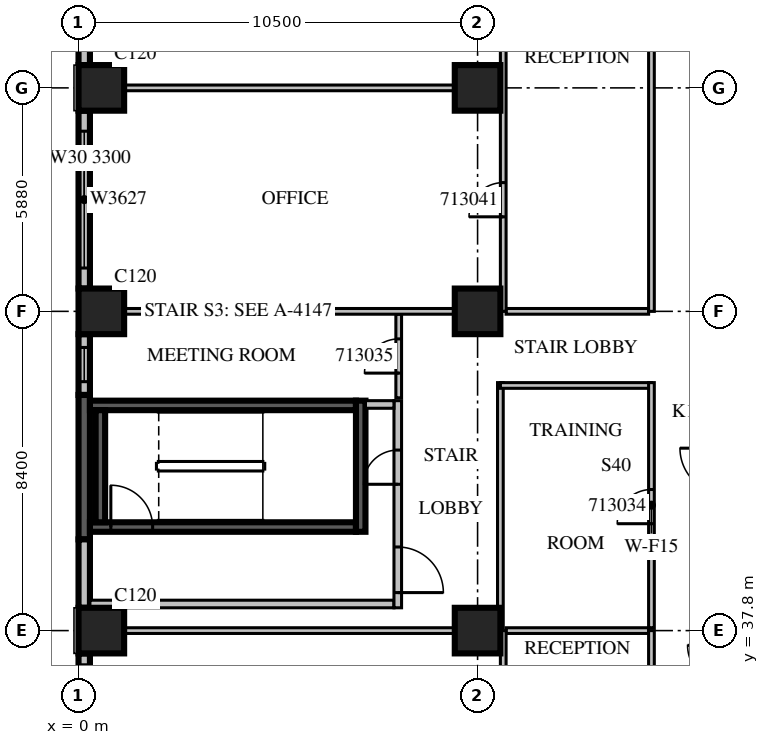
"""IFC4 building model, lengths in metres.
Left out: names, types, materials, properties, quantities, classifications, styles, units other than length and angle.
Written with IfcOpenShell. Run it as: python <this file> out.ifc"""

import sys

from ifc_helpers import new_model, si_unit, direction, frame, frame_2d, origin, origin_2d, place, context, subcontext, project, spatial, rectangle, extrude, source, transform, mapped, element, fill, save


model = new_model("IFC4")
c1 = context("Model", 3, precision=1e-05, world=origin(), true_north=direction((0.0, 1.0)))
c2 = subcontext(c1, "Body", "Model", "MODEL_VIEW")
j1 = project(units=[si_unit("LENGTHUNIT", "METRE"), si_unit("PLANEANGLEUNIT", "RADIAN")], contexts=[c1])
p1 = place(None, origin())
s1 = spatial("IfcSite", under=j1, at=p1, CompositionType="ELEMENT")
p2 = place(p1, origin())
s2 = spatial("IfcBuilding", under=s1, at=p2, CompositionType="ELEMENT")
p3 = place(p2, frame((0.0, 0.0, 65.7)))
s3 = spatial("IfcBuildingStorey", under=s2, at=p3, CompositionType="ELEMENT", Elevation=65.7)
m1 = source(origin(), c2, "Body", "SweptSolid", [
    extrude(rectangle(XDim=1.2, YDim=1.2, at=origin_2d()), origin(), (0.0, 0.0, 1.0), 4.2),
])
for number, where, z_axis, x_axis in (
    (1, (0.6, 37.8, 0.0), (0.0, 0.0, 1.0), (1.0, 0.0, 0.0)),
    (2, (10.5, 37.8, 0.0), (0.0, 0.0, 1.0), (1.0, 0.0, 0.0)),
    (3, (0.6, 46.2, 0.0), (0.0, 0.0, 1.0), (1.0, 0.0, 0.0)),
    (4, (10.5, 46.2, 0.0), (0.0, 0.0, 1.0), (1.0, 0.0, 0.0)),
    (5, (0.6, 52.08, 0.0), (0.0, 0.0, 1.0), (1.0, 0.0, 0.0)),
    (6, (10.5, 52.08, 0.0), (0.0, 0.0, 1.0), (1.0, 0.0, 0.0)),
):
    element("IfcColumn", number, at=place(p3, frame(where, z_axis=z_axis, x_axis=x_axis)), inside=s3, PredefinedType="COLUMN", context=c2, shape_type="MappedRepresentation", body=[
        mapped(m1, transform((0.0, 0.0, 0.0), scale=1.0)),
    ])
m2 = source(origin(), c2, "Body", "SweptSolid", [
    extrude(rectangle(XDim=4.68, YDim=0.3, at=frame_2d((2.34, 0.0))), origin(), (0.0, 0.0, 1.0), 3.3),
])
p4 = place(p3, frame((0.15, 57.36, 0.0), z_axis=(0.0, 0.0, 1.0), x_axis=(0.0, -1.0, 0.0)))
e7 = element("IfcWall", 7, at=p4, inside=s3, PredefinedType="STANDARD", context=c2, shape_type="MappedRepresentation", body=[
    mapped(m2, transform((0.0, 0.0, 0.0), scale=1.0)),
])
m3 = source(origin(), c2, "Body", "SweptSolid", [
    extrude(rectangle(XDim=1.2, YDim=2.7, at=frame_2d((0.6, 1.35))), frame((0.0, 0.16, 0.0), z_axis=(0.0, -1.0, 0.0), x_axis=(1.0, 0.0, 0.0)), (0.0, 0.0, 1.0), 0.32),
])
p5 = place(p4, frame((0.165, 0.0, 0.6)))
e8 = element("IfcOpeningElement", 8, at=p5, cuts=e7, PredefinedType="OPENING", context=c2, shape_type="MappedRepresentation", body=[
    mapped(m3, transform((0.0, 0.0, 0.0), scale=1.0)),
])
m4 = source(origin(), c2, "Body", "SweptSolid", [
    extrude(rectangle(XDim=2.4, YDim=2.7, at=frame_2d((1.2, 1.35))), frame((0.0, 0.16, 0.0), z_axis=(0.0, -1.0, 0.0), x_axis=(1.0, 0.0, 0.0)), (0.0, 0.0, 1.0), 0.32),
])
p6 = place(p4, frame((1.823, 0.0, 0.6)))
e9 = element("IfcOpeningElement", 9, at=p6, cuts=e7, PredefinedType="OPENING", context=c2, shape_type="MappedRepresentation", body=[
    mapped(m4, transform((0.0, 0.0, 0.0), scale=1.0)),
])
p7 = place(p3, frame((0.15, 51.48, 0.0), z_axis=(0.0, 0.0, 1.0), x_axis=(0.0, -1.0, 0.0)))
e10 = element("IfcWall", 10, at=p7, inside=s3, PredefinedType="STANDARD", context=c2, shape_type="MappedRepresentation", body=[
    mapped(m2, transform((0.0, 0.0, 0.0), scale=1.0)),
])
m5 = source(origin(), c2, "Body", "SweptSolid", [
    extrude(rectangle(XDim=3.6, YDim=2.7, at=frame_2d((1.8, 1.35))), frame((0.0, 0.16, 0.0), z_axis=(0.0, -1.0, 0.0), x_axis=(1.0, 0.0, 0.0)), (0.0, 0.0, 1.0), 0.32),
])
p8 = place(p7, frame((0.54, 0.0, 0.6)))
e11 = element("IfcOpeningElement", 11, at=p8, cuts=e10, PredefinedType="OPENING", context=c2, shape_type="MappedRepresentation", body=[
    mapped(m5, transform((0.0, 0.0, 0.0), scale=1.0)),
])
m6 = source(origin(), c2, "Body", "SweptSolid", [
    extrude(rectangle(XDim=1.6, YDim=0.3, at=frame_2d((0.8, 0.0))), origin(), (0.0, 0.0, 1.0), 3.8),
])
p9 = place(p3, frame((0.15, 45.6, 0.0), z_axis=(0.0, 0.0, 1.0), x_axis=(0.0, -1.0, 0.0)))
e12 = element("IfcWall", 12, at=p9, inside=s3, PredefinedType="STANDARD", context=c2, shape_type="MappedRepresentation", body=[
    mapped(m6, transform((0.0, 0.0, 0.0), scale=1.0)),
])
m7 = source(origin(), c2, "Body", "SweptSolid", [
    extrude(rectangle(XDim=0.9, YDim=2.7, at=frame_2d((0.45, 1.35))), frame((0.0, 0.16, 0.0), z_axis=(0.0, -1.0, 0.0), x_axis=(1.0, 0.0, 0.0)), (0.0, 0.0, 1.0), 0.32),
])
p10 = place(p9, frame((0.35, 0.0, 0.6)))
e13 = element("IfcOpeningElement", 13, at=p10, cuts=e12, PredefinedType="OPENING", context=c2, shape_type="MappedRepresentation", body=[
    mapped(m7, transform((0.0, 0.0, 0.0), scale=1.0)),
])
m8 = source(origin(), c2, "Body", "SweptSolid", [
    extrude(rectangle(XDim=3.8, YDim=0.3, at=frame_2d((1.9, 0.0))), origin(), (0.0, 0.0, 1.0), 3.8),
])
p11 = place(p3, frame((0.15, 44.0, 0.0), z_axis=(0.0, 0.0, 1.0), x_axis=(0.0, -1.0, 0.0)))
e14 = element("IfcWall", 14, at=p11, inside=s3, PredefinedType="SOLIDWALL", context=c2, shape_type="MappedRepresentation", body=[
    mapped(m8, transform((0.0, 0.0, 0.0), scale=1.0)),
])
m9 = source(origin(), c2, "Body", "SweptSolid", [
    extrude(rectangle(XDim=1.8, YDim=0.3, at=frame_2d((0.9, 0.0))), origin(), (0.0, 0.0, 1.0), 3.8),
])
p12 = place(p3, frame((0.15, 40.2, 0.0), z_axis=(0.0, 0.0, 1.0), x_axis=(0.0, -1.0, 0.0)))
e15 = element("IfcWall", 15, at=p12, inside=s3, PredefinedType="STANDARD", context=c2, shape_type="MappedRepresentation", body=[
    mapped(m9, transform((0.0, 0.0, 0.0), scale=1.0)),
])
m10 = source(origin(), c2, "Body", "SweptSolid", [
    extrude(rectangle(XDim=3.0, YDim=0.3, at=frame_2d((1.5, 0.0))), origin(), (0.0, 0.0, 1.0), 3.8),
])
p13 = place(p3, frame((0.15, 37.2, 0.0), z_axis=(0.0, 0.0, 1.0), x_axis=(0.0, -1.0, 0.0)))
e16 = element("IfcWall", 16, at=p13, inside=s3, PredefinedType="STANDARD", context=c2, shape_type="MappedRepresentation", body=[
    mapped(m10, transform((0.0, 0.0, 0.0), scale=1.0)),
])
p14 = place(p13, frame((0.3, 0.0, 0.6)))
e17 = element("IfcOpeningElement", 17, at=p14, cuts=e16, PredefinedType="OPENING", context=c2, shape_type="MappedRepresentation", body=[
    mapped(m4, transform((0.0, 0.0, 0.0), scale=1.0)),
])
m11 = source(origin(), c2, "Body", "SweptSolid", [
    extrude(rectangle(XDim=7.0, YDim=0.25, at=frame_2d((3.5, 0.0))), origin(), (0.0, 0.0, 1.0), 3.8),
])
p15 = place(p3, frame((0.3, 40.525, 0.0), z_axis=(0.0, 0.0, 1.0), x_axis=(1.0, 0.0, 0.0)))
e18 = element("IfcWall", 18, at=p15, inside=s3, PredefinedType="SOLIDWALL", context=c2, shape_type="MappedRepresentation", body=[
    mapped(m11, transform((0.0, 0.0, 0.0), scale=1.0)),
])
m12 = source(origin(), c2, "Body", "SweptSolid", [
    extrude(rectangle(XDim=1.1, YDim=2.1, at=frame_2d((0.55, 1.05))), frame((0.0, 0.135, 0.0), z_axis=(0.0, -1.0, 0.0), x_axis=(1.0, 0.0, 0.0)), (0.0, 0.0, 1.0), 0.27),
])
p16 = place(p15, frame((0.55, 0.0, 0.0)))
e19 = element("IfcOpeningElement", 19, at=p16, cuts=e18, PredefinedType="OPENING", context=c2, shape_type="MappedRepresentation", body=[
    mapped(m12, transform((0.0, 0.0, 0.0), scale=1.0)),
])
p17 = place(p3, frame((0.3, 43.725, 0.0), z_axis=(0.0, 0.0, 1.0), x_axis=(1.0, 0.0, 0.0)))
e20 = element("IfcWall", 20, at=p17, inside=s3, PredefinedType="SOLIDWALL", context=c2, shape_type="MappedRepresentation", body=[
    mapped(m11, transform((0.0, 0.0, 0.0), scale=1.0)),
])
m13 = source(origin(), c2, "Body", "SweptSolid", [
    extrude(rectangle(XDim=3.45, YDim=0.25, at=frame_2d((1.725, 0.0))), origin(), (0.0, 0.0, 1.0), 3.8),
])
p18 = place(p3, frame((7.425, 40.4, 0.0), z_axis=(0.0, 0.0, 1.0), x_axis=(0.0, 1.0, 0.0)))
e21 = element("IfcWall", 21, at=p18, inside=s3, PredefinedType="SOLIDWALL", context=c2, shape_type="MappedRepresentation", body=[
    mapped(m13, transform((0.0, 0.0, 0.0), scale=1.0)),
])
m14 = source(origin(), c2, "Body", "SweptSolid", [
    extrude(rectangle(XDim=2.95, YDim=0.25, at=frame_2d((1.475, 0.0))), origin(), (0.0, 0.0, 1.0), 3.8),
])
p19 = place(p3, frame((0.575, 40.65, 0.0), z_axis=(0.0, 0.0, 1.0), x_axis=(0.0, 1.0, 0.0)))
e22 = element("IfcWall", 22, at=p19, inside=s3, PredefinedType="SOLIDWALL", context=c2, shape_type="MappedRepresentation", body=[
    mapped(m14, transform((0.0, 0.0, 0.0), scale=1.0)),
])
m15 = source(origin(), c2, "Body", "SweptSolid", [
    extrude(rectangle(XDim=8.0, YDim=0.2, at=frame_2d((4.0, 0.0))), origin(), (0.0, 0.0, 1.0), 3.8),
])
p20 = place(p3, frame((0.3, 38.5, 0.0), z_axis=(0.0, 0.0, 1.0), x_axis=(1.0, 0.0, 0.0)))
e23 = element("IfcWall", 23, at=p20, inside=s3, PredefinedType="PARTITIONING", context=c2, shape_type="MappedRepresentation", body=[
    mapped(m15, transform((0.0, 0.0, 0.0), scale=1.0)),
])
m16 = source(origin(), c2, "Body", "SweptSolid", [
    extrude(rectangle(XDim=5.45, YDim=0.2, at=frame_2d((2.725, 0.0))), origin(), (0.0, 0.0, 1.0), 3.8),
])
p21 = place(p3, frame((8.4, 38.4, 0.0), z_axis=(0.0, 0.0, 1.0), x_axis=(0.0, 1.0, 0.0)))
e24 = element("IfcWall", 24, at=p21, inside=s3, PredefinedType="PARTITIONING", context=c2, shape_type="MappedRepresentation", body=[
    mapped(m16, transform((0.0, 0.0, 0.0), scale=1.0)),
])
m17 = source(origin(), c2, "Body", "SweptSolid", [
    extrude(rectangle(XDim=1.2, YDim=2.1, at=frame_2d((0.6, 1.05))), frame((0.0, 0.11, 0.0), z_axis=(0.0, -1.0, 0.0), x_axis=(1.0, 0.0, 0.0)), (0.0, 0.0, 1.0), 0.22),
])
p22 = place(p21, frame((0.4, 0.0, 0.0)))
e25 = element("IfcOpeningElement", 25, at=p22, cuts=e24, PredefinedType="OPENING", context=c2, shape_type="MappedRepresentation", body=[
    mapped(m17, transform((0.0, 0.0, 0.0), scale=1.0)),
])
m18 = source(origin(), c2, "Body", "SweptSolid", [
    extrude(rectangle(XDim=0.9, YDim=2.1, at=frame_2d((0.45, 1.05))), frame((0.0, 0.11, 0.0), z_axis=(0.0, -1.0, 0.0), x_axis=(1.0, 0.0, 0.0)), (0.0, 0.0, 1.0), 0.22),
])
p23 = place(p21, frame((3.25, 0.0, 0.0)))
e26 = element("IfcOpeningElement", 26, at=p23, cuts=e24, PredefinedType="OPENING", context=c2, shape_type="MappedRepresentation", body=[
    mapped(m18, transform((0.0, 0.0, 0.0), scale=1.0)),
])
m19 = source(origin(), c2, "Body", "SweptSolid", [
    extrude(rectangle(XDim=0.75, YDim=0.2, at=frame_2d((0.375, 0.0))), origin(), (0.0, 0.0, 1.0), 3.8),
])
p24 = place(p3, frame((7.55, 43.75, 0.0), z_axis=(0.0, 0.0, 1.0), x_axis=(1.0, 0.0, 0.0)))
e27 = element("IfcWall", 27, at=p24, inside=s3, PredefinedType="PARTITIONING", context=c2, shape_type="MappedRepresentation", body=[
    mapped(m19, transform((0.0, 0.0, 0.0), scale=1.0)),
])
m20 = source(origin(), c2, "Body", "SweptSolid", [
    extrude(rectangle(XDim=6.45, YDim=0.15, at=frame_2d((3.225, 0.0))), origin(), (0.0, 0.0, 1.0), 3.8),
])
p25 = place(p3, frame((11.1, 44.325, 0.0), z_axis=(0.0, 0.0, 1.0), x_axis=(0.0, -1.0, 0.0)))
e28 = element("IfcWall", 28, at=p25, inside=s3, PredefinedType="PARTITIONING", context=c2, shape_type="MappedRepresentation", body=[
    mapped(m20, transform((0.0, 0.0, 0.0), scale=1.0)),
])
m21 = source(origin(), c2, "Body", "SweptSolid", [
    extrude(rectangle(XDim=3.975, YDim=0.15, at=frame_2d((1.988, 0.0))), origin(), (0.0, 0.0, 1.0), 3.8),
])
p26 = place(p3, frame((15.075, 44.25, 0.0), z_axis=(0.0, 0.0, 1.0), x_axis=(-1.0, 0.0, 0.0)))
e29 = element("IfcWall", 29, at=p26, inside=s3, PredefinedType="PARTITIONING", context=c2, shape_type="MappedRepresentation", body=[
    mapped(m21, transform((0.0, 0.0, 0.0), scale=1.0)),
])
p27 = place(p3, frame((15.075, 37.875, 0.0), z_axis=(0.0, 0.0, 1.0), x_axis=(0.0, 1.0, 0.0)))
e30 = element("IfcWall", 30, at=p27, inside=s3, PredefinedType="PARTITIONING", context=c2, shape_type="MappedRepresentation", body=[
    mapped(m20, transform((0.0, 0.0, 0.0), scale=1.0)),
])
m22 = source(origin(), c2, "Body", "SweptSolid", [
    extrude(rectangle(XDim=0.9, YDim=2.1, at=frame_2d((0.45, 1.05))), frame((0.0, 0.085, 0.0), z_axis=(0.0, -1.0, 0.0), x_axis=(1.0, 0.0, 0.0)), (0.0, 0.0, 1.0), 0.17),
])
p28 = place(p27, frame((2.737, 0.0, 0.0)))
e31 = element("IfcOpeningElement", 31, at=p28, cuts=e30, PredefinedType="OPENING", context=c2, shape_type="MappedRepresentation", body=[
    mapped(m22, transform((0.0, 0.0, 0.0), scale=1.0)),
])
m23 = source(origin(), c2, "Body", "SweptSolid", [
    extrude(rectangle(XDim=2.2, YDim=0.15, at=frame_2d((1.1, 0.0))), origin(), (0.0, 0.0, 1.0), 3.8),
])
p29 = place(p3, frame((8.425, 43.925, 0.0), z_axis=(0.0, 0.0, 1.0), x_axis=(0.0, 1.0, 0.0)))
e32 = element("IfcWall", 32, at=p29, inside=s3, PredefinedType="PARTITIONING", context=c2, shape_type="MappedRepresentation", body=[
    mapped(m23, transform((0.0, 0.0, 0.0), scale=1.0)),
])
p30 = place(p29, frame((0.65, 0.0, 0.0)))
e33 = element("IfcOpeningElement", 33, at=p30, cuts=e32, PredefinedType="OPENING", context=c2, shape_type="MappedRepresentation", body=[
    mapped(m22, transform((0.0, 0.0, 0.0), scale=1.0)),
])
m24 = source(origin(), c2, "Body", "SweptSolid", [
    extrude(rectangle(XDim=8.702, YDim=0.15, at=frame_2d((4.351, 0.0))), origin(), (0.0, 0.0, 1.0), 3.8),
])
p31 = place(p3, frame((9.901, 37.8, 0.0), z_axis=(0.0, 0.0, 1.0), x_axis=(-1.0, 0.0, 0.0)))
e34 = element("IfcWall", 34, at=p31, inside=s3, PredefinedType="PARTITIONING", context=c2, shape_type="MappedRepresentation", body=[
    mapped(m24, transform((0.0, 0.0, 0.0), scale=1.0)),
])
m25 = source(origin(), c2, "Body", "SweptSolid", [
    extrude(rectangle(XDim=3.75, YDim=0.15, at=frame_2d((1.875, 0.0))), origin(), (0.0, 0.0, 1.0), 3.8),
])
p32 = place(p3, frame((15.0, 37.8, 0.0), z_axis=(0.0, 0.0, 1.0), x_axis=(-1.0, 0.0, 0.0)))
e35 = element("IfcWall", 35, at=p32, inside=s3, PredefinedType="PARTITIONING", context=c2, shape_type="MappedRepresentation", body=[
    mapped(m25, transform((0.0, 0.0, 0.0), scale=1.0)),
])
m26 = source(origin(), c2, "Body", "SweptSolid", [
    extrude(rectangle(XDim=8.4, YDim=0.15, at=frame_2d((4.2, 0.0))), origin(), (0.0, 0.0, 1.0), 3.8),
])
p33 = place(p3, frame((11.175, 29.4, 0.0), z_axis=(0.0, 0.0, 1.0), x_axis=(0.0, 1.0, 0.0)))
e36 = element("IfcWall", 36, at=p33, inside=s3, PredefinedType="PARTITIONING", context=c2, shape_type="MappedRepresentation", body=[
    mapped(m26, transform((0.0, 0.0, 0.0), scale=1.0)),
])
m27 = source(origin(), c2, "Body", "SweptSolid", [
    extrude(rectangle(XDim=1.1, YDim=2.1, at=frame_2d((0.55, 1.05))), frame((0.0, 0.085, 0.0), z_axis=(0.0, -1.0, 0.0), x_axis=(1.0, 0.0, 0.0)), (0.0, 0.0, 1.0), 0.17),
])
p34 = place(p33, frame((6.012, 0.0, 0.0)))
e37 = element("IfcOpeningElement", 37, at=p34, cuts=e36, PredefinedType="OPENING", context=c2, shape_type="MappedRepresentation", body=[
    mapped(m27, transform((0.0, 0.0, 0.0), scale=1.0)),
])
for number, where, z_axis, x_axis in (
    (38, (9.901, 52.08, 0.0), (0.0, 0.0, 1.0), (-1.0, 0.0, 0.0)),
    (39, (9.901, 46.2, 0.0), (0.0, 0.0, 1.0), (-1.0, 0.0, 0.0)),
):
    element("IfcWall", number, at=place(p3, frame(where, z_axis=z_axis, x_axis=x_axis)), inside=s3, PredefinedType="PARTITIONING", context=c2, shape_type="MappedRepresentation", body=[
        mapped(m24, transform((0.0, 0.0, 0.0), scale=1.0)),
    ])
p35 = place(p3, frame((15.0, 46.2, 0.0), z_axis=(0.0, 0.0, 1.0), x_axis=(-1.0, 0.0, 0.0)))
e40 = element("IfcWall", 40, at=p35, inside=s3, PredefinedType="PARTITIONING", context=c2, shape_type="MappedRepresentation", body=[
    mapped(m25, transform((0.0, 0.0, 0.0), scale=1.0)),
])
m28 = source(origin(), c2, "Body", "SweptSolid", [
    extrude(rectangle(XDim=19.02, YDim=0.15, at=frame_2d((9.51, 0.0))), origin(), (0.0, 0.0, 1.0), 3.8),
])
p36 = place(p3, frame((11.175, 46.2, 0.0), z_axis=(0.0, 0.0, 1.0), x_axis=(0.0, 1.0, 0.0)))
e41 = element("IfcWall", 41, at=p36, inside=s3, PredefinedType="PARTITIONING", context=c2, shape_type="MappedRepresentation", body=[
    mapped(m28, transform((0.0, 0.0, 0.0), scale=1.0)),
])
p37 = place(p36, frame((2.487, 0.0, 0.0)))
e42 = element("IfcOpeningElement", 42, at=p37, cuts=e41, PredefinedType="OPENING", context=c2, shape_type="MappedRepresentation", body=[
    mapped(m22, transform((0.0, 0.0, 0.0), scale=1.0)),
])
p38 = place(p36, frame((8.367, 0.0, 0.0)))
e43 = element("IfcOpeningElement", 43, at=p38, cuts=e41, PredefinedType="OPENING", context=c2, shape_type="MappedRepresentation", body=[
    mapped(m22, transform((0.0, 0.0, 0.0), scale=1.0)),
])
p39 = place(p36, frame((13.512, 0.0, 0.0)))
e44 = element("IfcOpeningElement", 44, at=p39, cuts=e41, PredefinedType="OPENING", context=c2, shape_type="MappedRepresentation", body=[
    mapped(m22, transform((0.0, 0.0, 0.0), scale=1.0)),
])
p40 = place(p36, frame((15.777, 0.0, 0.0)))
e45 = element("IfcOpeningElement", 45, at=p40, cuts=e41, PredefinedType="OPENING", context=c2, shape_type="MappedRepresentation", body=[
    mapped(m27, transform((0.0, 0.0, 0.0), scale=1.0)),
])
p41 = place(p3, frame((15.075, 29.4, 0.0), z_axis=(0.0, 0.0, 1.0), x_axis=(0.0, 1.0, 0.0)))
e46 = element("IfcWall", 46, at=p41, inside=s3, PredefinedType="PARTITIONING", context=c2, shape_type="MappedRepresentation", body=[
    mapped(m26, transform((0.0, 0.0, 0.0), scale=1.0)),
])
p42 = place(p41, frame((6.274, 0.0, 0.0)))
e47 = element("IfcOpeningElement", 47, at=p42, cuts=e46, PredefinedType="OPENING", context=c2, shape_type="MappedRepresentation", body=[
    mapped(m27, transform((0.0, 0.0, 0.0), scale=1.0)),
])
p43 = place(p41, frame((0.689, 0.0, 0.0)))
e48 = element("IfcOpeningElement", 48, at=p43, cuts=e46, PredefinedType="OPENING", context=c2, shape_type="MappedRepresentation", body=[
    mapped(m22, transform((0.0, 0.0, 0.0), scale=1.0)),
])
p44 = place(p41, frame((3.313, 0.0, 0.0)))
e49 = element("IfcOpeningElement", 49, at=p44, cuts=e46, PredefinedType="OPENING", context=c2, shape_type="MappedRepresentation", body=[
    mapped(m22, transform((0.0, 0.0, 0.0), scale=1.0)),
])
p45 = place(p3, frame((15.075, 46.2, 0.0), z_axis=(0.0, 0.0, 1.0), x_axis=(0.0, 1.0, 0.0)))
e50 = element("IfcWall", 50, at=p45, inside=s3, PredefinedType="PARTITIONING", context=c2, shape_type="MappedRepresentation", body=[
    mapped(m28, transform((0.0, 0.0, 0.0), scale=1.0)),
])
m29 = source(origin(), c2, "Body", "SweptSolid", [
    extrude(rectangle(XDim=1.2, YDim=2.1, at=frame_2d((0.6, 1.05))), frame((0.0, 0.085, 0.0), z_axis=(0.0, -1.0, 0.0), x_axis=(1.0, 0.0, 0.0)), (0.0, 0.0, 1.0), 0.17),
])
p46 = place(p45, frame((7.17, 0.0, 0.0)))
e51 = element("IfcOpeningElement", 51, at=p46, cuts=e50, PredefinedType="OPENING", context=c2, shape_type="MappedRepresentation", body=[
    mapped(m29, transform((0.0, 0.0, 0.0), scale=1.0)),
])
p47 = place(p45, frame((16.767, 0.0, 0.0)))
e52 = element("IfcOpeningElement", 52, at=p47, cuts=e50, PredefinedType="OPENING", context=c2, shape_type="MappedRepresentation", body=[
    mapped(m27, transform((0.0, 0.0, 0.0), scale=1.0)),
])
m30 = source(origin(), c2, "Body", "SweptSolid", [
    extrude(rectangle(XDim=3.6, YDim=2.7, at=frame_2d((1.8, 1.35))), frame((0.0, 0.03, 0.0), z_axis=(0.0, -1.0, 0.0), x_axis=(1.0, 0.0, 0.0)), (0.0, 0.0, 1.0), 0.06),
])
p48 = place(p8, origin())
e53 = element("IfcWindow", 53, at=p48, inside=s3, PartitioningType="SINGLE_PANEL", PredefinedType="WINDOW", context=c2, shape_type="MappedRepresentation", body=[
    mapped(m30, transform((0.0, 0.0, 0.0), scale=1.0)),
])
fill(e11, e53)
m31 = source(origin(), c2, "Body", "SweptSolid", [
    extrude(rectangle(XDim=0.9, YDim=2.7, at=frame_2d((0.45, 1.35))), frame((0.0, 0.03, 0.0), z_axis=(0.0, -1.0, 0.0), x_axis=(1.0, 0.0, 0.0)), (0.0, 0.0, 1.0), 0.06),
])
p49 = place(p10, origin())
e54 = element("IfcWindow", 54, at=p49, inside=s3, PartitioningType="SINGLE_PANEL", PredefinedType="WINDOW", context=c2, shape_type="MappedRepresentation", body=[
    mapped(m31, transform((0.0, 0.0, 0.0), scale=1.0)),
])
fill(e13, e54)
m32 = source(origin(), c2, "Body", "SweptSolid", [
    extrude(rectangle(XDim=2.4, YDim=2.7, at=frame_2d((1.2, 1.35))), frame((0.0, 0.03, 0.0), z_axis=(0.0, -1.0, 0.0), x_axis=(1.0, 0.0, 0.0)), (0.0, 0.0, 1.0), 0.06),
])
p50 = place(p14, origin())
e55 = element("IfcWindow", 55, at=p50, inside=s3, PartitioningType="SINGLE_PANEL", PredefinedType="WINDOW", context=c2, shape_type="MappedRepresentation", body=[
    mapped(m32, transform((0.0, 0.0, 0.0), scale=1.0)),
])
fill(e17, e55)
m33 = source(origin(), c2, "Body", "SweptSolid", [
    extrude(rectangle(XDim=1.1, YDim=2.1, at=frame_2d((0.55, 1.05))), frame((0.0, 0.025, 0.0), z_axis=(0.0, -1.0, 0.0), x_axis=(1.0, 0.0, 0.0)), (0.0, 0.0, 1.0), 0.05),
])
p51 = place(p16, origin())
e56 = element("IfcDoor", 56, at=p51, inside=s3, OperationType="SINGLE_SWING_LEFT", PredefinedType="DOOR", context=c2, shape_type="MappedRepresentation", body=[
    mapped(m33, transform((0.0, 0.0, 0.0), scale=1.0)),
])
fill(e19, e56)
m34 = source(origin(), c2, "Body", "SweptSolid", [
    extrude(rectangle(XDim=1.2, YDim=2.1, at=frame_2d((0.6, 1.05))), frame((0.0, 0.025, 0.0), z_axis=(0.0, -1.0, 0.0), x_axis=(1.0, 0.0, 0.0)), (0.0, 0.0, 1.0), 0.05),
])
p52 = place(p22, origin())
e57 = element("IfcDoor", 57, at=p52, inside=s3, OperationType="SINGLE_SWING_RIGHT", PredefinedType="DOOR", context=c2, shape_type="MappedRepresentation", body=[
    mapped(m34, transform((0.0, 0.0, 0.0), scale=1.0)),
])
fill(e25, e57)
m35 = source(origin(), c2, "Body", "SweptSolid", [
    extrude(rectangle(XDim=0.9, YDim=2.1, at=frame_2d((0.45, 1.05))), frame((0.0, 0.025, 0.0), z_axis=(0.0, -1.0, 0.0), x_axis=(1.0, 0.0, 0.0)), (0.0, 0.0, 1.0), 0.05),
])
p53 = place(p23, origin())
e58 = element("IfcDoor", 58, at=p53, inside=s3, OperationType="SINGLE_SWING_LEFT", PredefinedType="DOOR", context=c2, shape_type="MappedRepresentation", body=[
    mapped(m35, transform((0.0, 0.0, 0.0), scale=1.0)),
])
fill(e26, e58)
p54 = place(p28, origin())
e59 = element("IfcDoor", 59, at=p54, inside=s3, OperationType="SINGLE_SWING_LEFT", PredefinedType="DOOR", context=c2, shape_type="MappedRepresentation", body=[
    mapped(m35, transform((0.0, 0.0, 0.0), scale=1.0)),
])
fill(e31, e59)
p55 = place(p30, origin())
e60 = element("IfcDoor", 60, at=p55, inside=s3, OperationType="SINGLE_SWING_LEFT", PredefinedType="DOOR", context=c2, shape_type="MappedRepresentation", body=[
    mapped(m35, transform((0.0, 0.0, 0.0), scale=1.0)),
])
fill(e33, e60)
p56 = place(p37, origin())
e61 = element("IfcDoor", 61, at=p56, inside=s3, OperationType="SINGLE_SWING_LEFT", PredefinedType="DOOR", context=c2, shape_type="MappedRepresentation", body=[
    mapped(m35, transform((0.0, 0.0, 0.0), scale=1.0)),
])
fill(e42, e61)
save(model, sys.argv[1])
